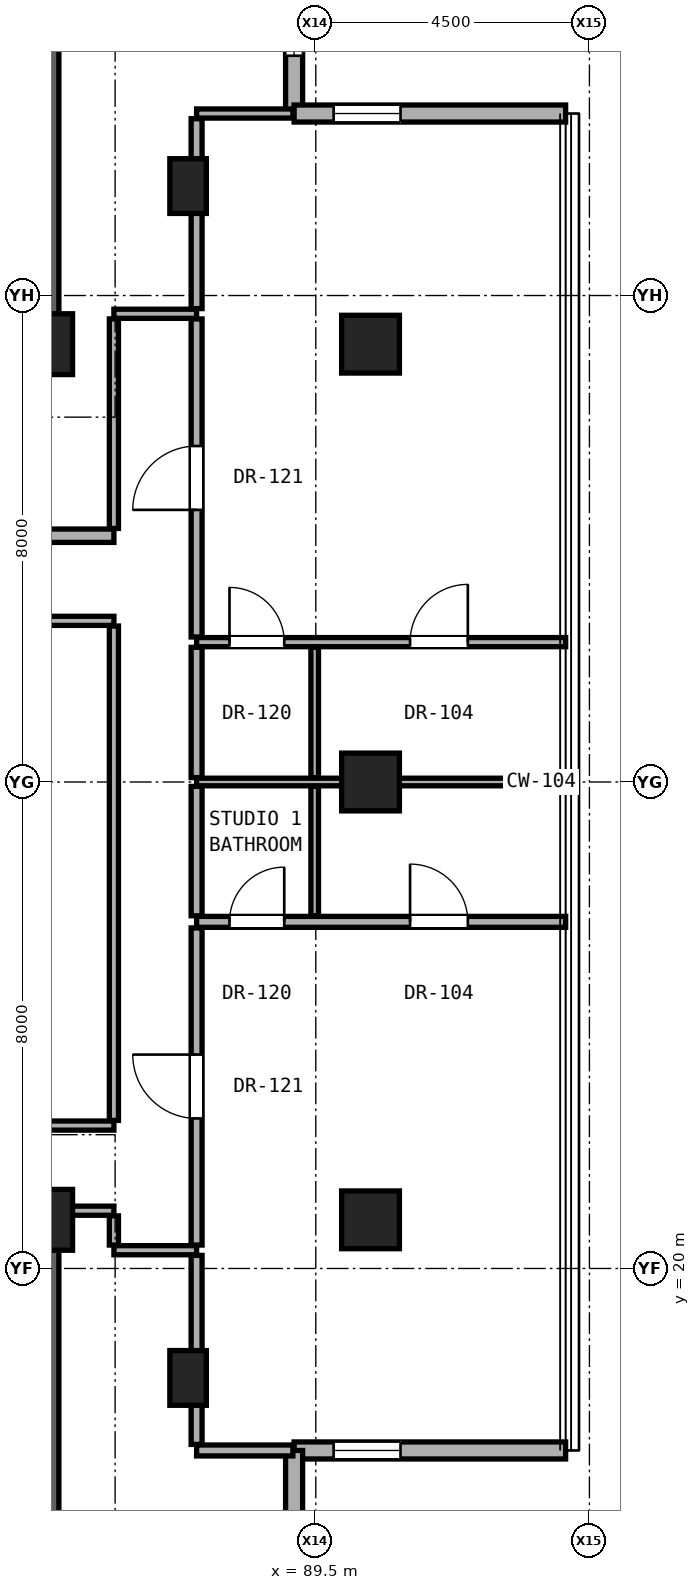
"""IFC4 building model, lengths in metres.
Left out: names, types, materials, properties, quantities, classifications, styles, units other than length and angle.
Written with IfcOpenShell. Run it as: python <this file> out.ifc"""

import sys

from ifc_helpers import new_model, si_unit, direction, frame, frame_2d, origin, origin_2d, place, context, subcontext, project, spatial, rectangle, hollow_rectangle, extrude, element, fill, save


model = new_model("IFC4")
c1 = context("Model", 3, precision=1e-05, world=origin(), true_north=direction((0.0, 1.0)))
c2 = subcontext(c1, "Body", "Model", "MODEL_VIEW")
j1 = project(units=[si_unit("LENGTHUNIT", "METRE"), si_unit("PLANEANGLEUNIT", "RADIAN")], contexts=[c1])
p1 = place(None, origin())
s1 = spatial("IfcSite", under=j1, at=p1, CompositionType="ELEMENT")
p2 = place(p1, origin())
s2 = spatial("IfcBuilding", under=s1, at=p2, CompositionType="ELEMENT")
p3 = place(p2, frame((0.0, 0.0, 160.9)))
s3 = spatial("IfcBuildingStorey", under=s2, at=p3, CompositionType="ELEMENT", Elevation=160.9)
for number, where, z_axis, x_axis in (
    (1, (85.0, 20.8, 0.0), (0.0, 0.0, 1.0), (1.0, 0.0, 0.0)),
    (2, (85.0, 35.2, 0.0), (0.0, 0.0, 1.0), (1.0, 0.0, 0.0)),
):
    element("IfcColumn", number, at=place(p3, frame(where, z_axis=z_axis, x_axis=x_axis)), inside=s3, PredefinedType="COLUMN", context=c2, shape_type="SweptSolid", body=[
        extrude(rectangle(XDim=1.0, YDim=1.0, at=origin_2d()), origin(), (0.0, 0.0, 1.0), 3.25),
    ])
for number, where, z_axis, x_axis in (
    (3, (90.4, 20.8, 0.0), (0.0, 0.0, 1.0), (1.0, 0.0, 0.0)),
    (4, (90.4, 28.0, 0.0), (0.0, 0.0, 1.0), (1.0, 0.0, 0.0)),
    (5, (90.4, 35.2, 0.0), (0.0, 0.0, 1.0), (1.0, 0.0, 0.0)),
):
    element("IfcColumn", number, at=place(p3, frame(where, z_axis=z_axis, x_axis=x_axis)), inside=s3, PredefinedType="COLUMN", context=c2, shape_type="SweptSolid", body=[
        extrude(hollow_rectangle(XDim=0.95, YDim=0.95, WallThickness=0.05, at=origin_2d()), origin(), (0.0, 0.0, 1.0), 3.25),
    ])
for number, where, z_axis, x_axis in (
    (6, (87.4, 18.2, 0.0), (0.0, 0.0, 1.0), (1.0, 0.0, 0.0)),
    (7, (87.4, 37.8, 0.0), (0.0, 0.0, 1.0), (1.0, 0.0, 0.0)),
):
    element("IfcColumn", number, at=place(p3, frame(where, z_axis=z_axis, x_axis=x_axis)), inside=s3, PredefinedType="PILASTER", context=c2, shape_type="SweptSolid", body=[
        extrude(rectangle(XDim=0.6, YDim=0.9, at=origin_2d()), origin(), (0.0, 0.0, 1.0), 3.25),
    ])
for number, where, z_axis, x_axis in (
    (8, (85.0, 35.2, 0.0), (0.0, 0.0, 1.0), (0.0, 1.0, 0.0)),
    (9, (85.0, 15.2, 0.0), (0.0, 0.0, 1.0), (0.0, 1.0, 0.0)),
):
    element("IfcWall", number, at=place(p3, frame(where, z_axis=z_axis, x_axis=x_axis)), inside=s3, PredefinedType="SHEAR", context=c2, shape_type="SweptSolid", body=[
        extrude(rectangle(XDim=5.6, YDim=0.55, at=frame_2d((2.8, 0.0))), origin(), (0.0, 0.0, 1.0), 3.05),
    ])
p4 = place(p3, frame((89.143, 38.993, 0.0), z_axis=(0.0, 0.0, 1.0), x_axis=(0.0, 1.0, 0.0)))
e10 = element("IfcWall", 10, at=p4, inside=s3, PredefinedType="SOLIDWALL", context=c2, shape_type="SweptSolid", body=[
    extrude(rectangle(XDim=4.465, YDim=0.28, at=frame_2d((2.232, 0.0))), origin(), (0.0, 0.0, 1.0), 3.03),
])
p5 = place(p4, frame((0.95, 0.0, 0.85)))
e11 = element("IfcOpeningElement", 11, at=p5, cuts=e10, PredefinedType="OPENING", context=c2, shape_type="SweptSolid", body=[
    extrude(rectangle(XDim=1.1, YDim=2.0, at=frame_2d((0.55, 1.0))), frame((0.0, 0.15, 0.0), z_axis=(0.0, -1.0, 0.0), x_axis=(1.0, 0.0, 0.0)), (0.0, 0.0, 1.0), 0.3),
])
p6 = place(p3, frame((89.143, 17.007, 0.0), z_axis=(0.0, 0.0, 1.0), x_axis=(1.0, 0.0, 0.0)))
e12 = element("IfcWall", 12, at=p6, inside=s3, PredefinedType="SOLIDWALL", context=c2, shape_type="SweptSolid", body=[
    extrude(rectangle(XDim=4.465, YDim=0.28, at=frame_2d((2.232, 0.0))), origin(), (0.0, 0.0, 1.0), 3.03),
])
p7 = place(p6, frame((0.65, 0.0, 0.85)))
e13 = element("IfcOpeningElement", 13, at=p7, cuts=e12, PredefinedType="OPENING", context=c2, shape_type="SweptSolid", body=[
    extrude(rectangle(XDim=1.1, YDim=2.0, at=frame_2d((0.55, 1.0))), frame((0.0, 0.15, 0.0), z_axis=(0.0, -1.0, 0.0), x_axis=(1.0, 0.0, 0.0)), (0.0, 0.0, 1.0), 0.3),
])
p8 = place(p3, frame((89.143, 12.542, 0.0), z_axis=(0.0, 0.0, 1.0), x_axis=(0.0, 1.0, 0.0)))
e14 = element("IfcWall", 14, at=p8, inside=s3, PredefinedType="SOLIDWALL", context=c2, shape_type="SweptSolid", body=[
    extrude(rectangle(XDim=4.465, YDim=0.28, at=frame_2d((2.232, 0.0))), origin(), (0.0, 0.0, 1.0), 3.03),
])
p9 = place(p3, frame((93.608, 38.993, 0.0), z_axis=(0.0, 0.0, 1.0), x_axis=(-1.0, 0.0, 0.0)))
e15 = element("IfcWall", 15, at=p9, inside=s3, PredefinedType="SOLIDWALL", context=c2, shape_type="SweptSolid", body=[
    extrude(rectangle(XDim=4.465, YDim=0.28, at=frame_2d((2.232, 0.0))), origin(), (0.0, 0.0, 1.0), 3.03),
])
p10 = place(p9, frame((2.715, 0.0, 0.85)))
e16 = element("IfcOpeningElement", 16, at=p10, cuts=e15, PredefinedType="OPENING", context=c2, shape_type="SweptSolid", body=[
    extrude(rectangle(XDim=1.1, YDim=2.0, at=frame_2d((0.55, 1.0))), frame((0.0, 0.15, 0.0), z_axis=(0.0, -1.0, 0.0), x_axis=(1.0, 0.0, 0.0)), (0.0, 0.0, 1.0), 0.3),
])
p11 = place(p3, frame((87.54, 17.007, 0.0), z_axis=(0.0, 0.0, 1.0), x_axis=(1.0, 0.0, 0.0)))
e17 = element("IfcWall", 17, at=p11, inside=s3, PredefinedType="PARTITIONING", context=c2, shape_type="SweptSolid", body=[
    extrude(rectangle(XDim=1.583, YDim=0.18, at=frame_2d((0.792, 0.0))), origin(), (0.0, 0.0, 1.0), 3.05),
])
p12 = place(p3, frame((86.18, 20.3, 0.0), z_axis=(0.0, 0.0, 1.0), x_axis=(1.0, 0.0, 0.0)))
e18 = element("IfcWall", 18, at=p12, inside=s3, PredefinedType="PARTITIONING", context=c2, shape_type="SweptSolid", body=[
    extrude(rectangle(XDim=1.36, YDim=0.15, at=frame_2d((0.68, 0.0))), origin(), (0.0, 0.0, 1.0), 3.05),
])
p13 = place(p3, frame((85.27, 20.95, 0.0), z_axis=(0.0, 0.0, 1.0), x_axis=(1.0, 0.0, 0.0)))
e19 = element("IfcWall", 19, at=p13, inside=s3, PredefinedType="PARTITIONING", context=c2, shape_type="SweptSolid", body=[
    extrude(rectangle(XDim=0.91, YDim=0.15, at=frame_2d((0.455, 0.0))), origin(), (0.0, 0.0, 1.0), 2.442),
])
p14 = place(p3, frame((66.68, 22.35, 0.0), z_axis=(0.0, 0.0, 1.0), x_axis=(1.0, 0.0, 0.0)))
e20 = element("IfcWall", 20, at=p14, inside=s3, PredefinedType="PARTITIONING", context=c2, shape_type="SweptSolid", body=[
    extrude(rectangle(XDim=19.5, YDim=0.15, at=frame_2d((9.75, 0.0))), origin(), (0.0, 0.0, 1.0), 2.186),
])
p15 = place(p14, frame((8.053, 0.0, 0.0)))
e21 = element("IfcOpeningElement", 21, at=p15, cuts=e20, PredefinedType="OPENING", context=c2, shape_type="SweptSolid", body=[
    extrude(rectangle(XDim=0.85, YDim=2.01, at=frame_2d((0.425, 1.005))), frame((0.0, 0.085, 0.0), z_axis=(0.0, -1.0, 0.0), x_axis=(1.0, 0.0, 0.0)), (0.0, 0.0, 1.0), 0.17),
])
p16 = place(p3, frame((87.54, 25.7, 0.0), z_axis=(0.0, 0.0, 1.0), x_axis=(1.0, 0.0, 0.0)))
e22 = element("IfcWall", 22, at=p16, inside=s3, PredefinedType="PARTITIONING", context=c2, shape_type="SweptSolid", body=[
    extrude(rectangle(XDim=6.069, YDim=0.18, at=frame_2d((3.034, 0.0))), origin(), (0.0, 0.0, 1.0), 2.269),
])
p17 = place(p16, frame((3.51, 0.0, 0.0)))
e23 = element("IfcOpeningElement", 23, at=p17, cuts=e22, PredefinedType="OPENING", context=c2, shape_type="SweptSolid", body=[
    extrude(rectangle(XDim=0.95, YDim=2.15, at=frame_2d((0.475, 1.075))), frame((0.0, 0.1, 0.0), z_axis=(0.0, -1.0, 0.0), x_axis=(1.0, 0.0, 0.0)), (0.0, 0.0, 1.0), 0.2),
])
p18 = place(p16, frame((0.541, 0.0, 0.0)))
e24 = element("IfcOpeningElement", 24, at=p18, cuts=e22, PredefinedType="OPENING", context=c2, shape_type="SweptSolid", body=[
    extrude(rectangle(XDim=0.9, YDim=2.1, at=frame_2d((0.45, 1.05))), frame((0.0, 0.1, 0.0), z_axis=(0.0, -1.0, 0.0), x_axis=(1.0, 0.0, 0.0)), (0.0, 0.0, 1.0), 0.2),
])
p19 = place(p3, frame((87.54, 28.0, 0.0), z_axis=(0.0, 0.0, 1.0), x_axis=(1.0, 0.0, 0.0)))
e25 = element("IfcWall", 25, at=p19, inside=s3, PredefinedType="PARTITIONING", context=c2, shape_type="SweptSolid", body=[
    extrude(rectangle(XDim=6.069, YDim=0.125, at=frame_2d((3.034, 0.0))), origin(), (0.0, 0.0, 1.0), 2.269),
])
p20 = place(p3, frame((87.54, 30.3, 0.0), z_axis=(0.0, 0.0, 1.0), x_axis=(1.0, 0.0, 0.0)))
e26 = element("IfcWall", 26, at=p20, inside=s3, PredefinedType="PARTITIONING", context=c2, shape_type="SweptSolid", body=[
    extrude(rectangle(XDim=6.069, YDim=0.15, at=frame_2d((3.034, 0.0))), origin(), (0.0, 0.0, 1.0), 2.269),
])
p21 = place(p20, frame((3.51, 0.0, 0.0)))
e27 = element("IfcOpeningElement", 27, at=p21, cuts=e26, PredefinedType="OPENING", context=c2, shape_type="SweptSolid", body=[
    extrude(rectangle(XDim=0.95, YDim=2.15, at=frame_2d((0.475, 1.075))), frame((0.0, 0.085, 0.0), z_axis=(0.0, -1.0, 0.0), x_axis=(1.0, 0.0, 0.0)), (0.0, 0.0, 1.0), 0.17),
])
p22 = place(p20, frame((0.541, 0.0, 0.0)))
e28 = element("IfcOpeningElement", 28, at=p22, cuts=e26, PredefinedType="OPENING", context=c2, shape_type="SweptSolid", body=[
    extrude(rectangle(XDim=0.9, YDim=2.1, at=frame_2d((0.45, 1.05))), frame((0.0, 0.085, 0.0), z_axis=(0.0, -1.0, 0.0), x_axis=(1.0, 0.0, 0.0)), (0.0, 0.0, 1.0), 0.17),
])
p23 = place(p3, frame((66.68, 30.65, 0.0), z_axis=(0.0, 0.0, 1.0), x_axis=(1.0, 0.0, 0.0)))
e29 = element("IfcWall", 29, at=p23, inside=s3, PredefinedType="PARTITIONING", context=c2, shape_type="SweptSolid", body=[
    extrude(rectangle(XDim=19.5, YDim=0.15, at=frame_2d((9.75, 0.0))), origin(), (0.0, 0.0, 1.0), 2.186),
])
p24 = place(p23, frame((3.745, 0.0, 0.0)))
e30 = element("IfcOpeningElement", 30, at=p24, cuts=e29, PredefinedType="OPENING", context=c2, shape_type="SweptSolid", body=[
    extrude(rectangle(XDim=0.95, YDim=2.15, at=frame_2d((0.475, 1.075))), frame((0.0, 0.085, 0.0), z_axis=(0.0, -1.0, 0.0), x_axis=(1.0, 0.0, 0.0)), (0.0, 0.0, 1.0), 0.17),
])
p25 = place(p23, frame((15.098, 0.0, 0.0)))
e31 = element("IfcOpeningElement", 31, at=p25, cuts=e29, PredefinedType="OPENING", context=c2, shape_type="SweptSolid", body=[
    extrude(rectangle(XDim=0.85, YDim=2.01, at=frame_2d((0.425, 1.005))), frame((0.0, 0.085, 0.0), z_axis=(0.0, -1.0, 0.0), x_axis=(1.0, 0.0, 0.0)), (0.0, 0.0, 1.0), 0.17),
])
p26 = place(p3, frame((71.55, 32.05, 0.0), z_axis=(0.0, 0.0, 1.0), x_axis=(1.0, 0.0, 0.0)))
e32 = element("IfcWall", 32, at=p26, inside=s3, PredefinedType="SOLIDWALL", context=c2, shape_type="SweptSolid", body=[
    extrude(rectangle(XDim=14.63, YDim=0.22, at=frame_2d((7.315, 0.0))), origin(), (0.0, 0.0, 1.0), 2.186),
])
p27 = place(p26, frame((6.065, 0.0, 0.0)))
e33 = element("IfcOpeningElement", 33, at=p27, cuts=e32, PredefinedType="OPENING", context=c2, shape_type="SweptSolid", body=[
    extrude(rectangle(XDim=0.85, YDim=2.01, at=frame_2d((0.425, 1.005))), frame((0.0, 0.12, 0.0), z_axis=(0.0, -1.0, 0.0), x_axis=(1.0, 0.0, 0.0)), (0.0, 0.0, 1.0), 0.24),
])
p28 = place(p26, frame((10.535, 0.0, 0.0)))
e34 = element("IfcOpeningElement", 34, at=p28, cuts=e32, PredefinedType="OPENING", context=c2, shape_type="SweptSolid", body=[
    extrude(rectangle(XDim=0.95, YDim=2.15, at=frame_2d((0.475, 1.075))), frame((0.0, 0.12, 0.0), z_axis=(0.0, -1.0, 0.0), x_axis=(1.0, 0.0, 0.0)), (0.0, 0.0, 1.0), 0.24),
])
p29 = place(p26, frame((1.65, 0.0, 0.0)))
e35 = element("IfcOpeningElement", 35, at=p29, cuts=e32, PredefinedType="OPENING", context=c2, shape_type="SweptSolid", body=[
    extrude(rectangle(XDim=0.85, YDim=2.01, at=frame_2d((0.425, 1.005))), frame((0.0, 0.12, 0.0), z_axis=(0.0, -1.0, 0.0), x_axis=(1.0, 0.0, 0.0)), (0.0, 0.0, 1.0), 0.24),
])
p30 = place(p3, frame((86.18, 35.7, 0.0), z_axis=(0.0, 0.0, 1.0), x_axis=(1.0, 0.0, 0.0)))
e36 = element("IfcWall", 36, at=p30, inside=s3, PredefinedType="PARTITIONING", context=c2, shape_type="SweptSolid", body=[
    extrude(rectangle(XDim=1.36, YDim=0.15, at=frame_2d((0.68, 0.0))), origin(), (0.0, 0.0, 1.0), 3.05),
])
p31 = place(p3, frame((87.54, 38.993, 0.0), z_axis=(0.0, 0.0, 1.0), x_axis=(1.0, 0.0, 0.0)))
e37 = element("IfcWall", 37, at=p31, inside=s3, PredefinedType="PARTITIONING", context=c2, shape_type="SweptSolid", body=[
    extrude(rectangle(XDim=1.583, YDim=0.15, at=frame_2d((0.792, 0.0))), origin(), (0.0, 0.0, 1.0), 3.05),
])
p32 = place(p3, frame((86.18, 20.385, 0.0), z_axis=(0.0, 0.0, 1.0), x_axis=(0.0, 1.0, 0.0)))
e38 = element("IfcWall", 38, at=p32, inside=s3, PredefinedType="PARTITIONING", context=c2, shape_type="SweptSolid", body=[
    extrude(rectangle(XDim=0.48, YDim=0.15, at=frame_2d((0.24, 0.0))), origin(), (0.0, 0.0, 1.0), 2.442),
])
p33 = place(p3, frame((86.18, 22.435, 0.0), z_axis=(0.0, 0.0, 1.0), x_axis=(0.0, 1.0, 0.0)))
e39 = element("IfcWall", 39, at=p33, inside=s3, PredefinedType="PARTITIONING", context=c2, shape_type="SweptSolid", body=[
    extrude(rectangle(XDim=8.13, YDim=0.15, at=frame_2d((4.065, 0.0))), origin(), (0.0, 0.0, 1.0), 2.346),
])
p34 = place(p3, frame((86.18, 32.17, 0.0), z_axis=(0.0, 0.0, 1.0), x_axis=(0.0, 1.0, 0.0)))
e40 = element("IfcWall", 40, at=p34, inside=s3, PredefinedType="PARTITIONING", context=c2, shape_type="SweptSolid", body=[
    extrude(rectangle(XDim=3.445, YDim=0.15, at=frame_2d((1.723, 0.0))), origin(), (0.0, 0.0, 1.0), 2.442),
])
p35 = place(p3, frame((87.54, 17.107, 0.0), z_axis=(0.0, 0.0, 1.0), x_axis=(0.0, 1.0, 0.0)))
e41 = element("IfcWall", 41, at=p35, inside=s3, PredefinedType="PARTITIONING", context=c2, shape_type="SweptSolid", body=[
    extrude(rectangle(XDim=3.108, YDim=0.18, at=frame_2d((1.554, 0.0))), origin(), (0.0, 0.0, 1.0), 2.493),
])
p36 = place(p3, frame((87.54, 20.385, 0.0), z_axis=(0.0, 0.0, 1.0), x_axis=(0.0, 1.0, 0.0)))
e42 = element("IfcWall", 42, at=p36, inside=s3, PredefinedType="PARTITIONING", context=c2, shape_type="SweptSolid", body=[
    extrude(rectangle(XDim=5.215, YDim=0.18, at=frame_2d((2.607, 0.0))), origin(), (0.0, 0.0, 1.0), 2.442),
])
p37 = place(p36, frame((2.083, 0.0, 0.0)))
e43 = element("IfcOpeningElement", 43, at=p37, cuts=e42, PredefinedType="OPENING", context=c2, shape_type="SweptSolid", body=[
    extrude(rectangle(XDim=1.05, YDim=2.2, at=frame_2d((0.525, 1.1))), frame((0.0, 0.1, 0.0), z_axis=(0.0, -1.0, 0.0), x_axis=(1.0, 0.0, 0.0)), (0.0, 0.0, 1.0), 0.2),
])
p38 = place(p3, frame((87.54, 25.8, 0.0), z_axis=(0.0, 0.0, 1.0), x_axis=(0.0, 1.0, 0.0)))
e44 = element("IfcWall", 44, at=p38, inside=s3, PredefinedType="PARTITIONING", context=c2, shape_type="SweptSolid", body=[
    extrude(rectangle(XDim=2.127, YDim=0.18, at=frame_2d((1.064, 0.0))), origin(), (0.0, 0.0, 1.0), 2.346),
])
p39 = place(p3, frame((87.54, 28.073, 0.0), z_axis=(0.0, 0.0, 1.0), x_axis=(0.0, 1.0, 0.0)))
e45 = element("IfcWall", 45, at=p39, inside=s3, PredefinedType="PARTITIONING", context=c2, shape_type="SweptSolid", body=[
    extrude(rectangle(XDim=2.143, YDim=0.18, at=frame_2d((1.071, 0.0))), origin(), (0.0, 0.0, 1.0), 2.346),
])
p40 = place(p3, frame((87.54, 30.385, 0.0), z_axis=(0.0, 0.0, 1.0), x_axis=(0.0, 1.0, 0.0)))
e46 = element("IfcWall", 46, at=p40, inside=s3, PredefinedType="PARTITIONING", context=c2, shape_type="SweptSolid", body=[
    extrude(rectangle(XDim=5.23, YDim=0.18, at=frame_2d((2.615, 0.0))), origin(), (0.0, 0.0, 1.0), 2.442),
])
p41 = place(p40, frame((2.09, 0.0, 0.0)))
e47 = element("IfcOpeningElement", 47, at=p41, cuts=e46, PredefinedType="OPENING", context=c2, shape_type="SweptSolid", body=[
    extrude(rectangle(XDim=1.05, YDim=2.2, at=frame_2d((0.525, 1.1))), frame((0.0, 0.1, 0.0), z_axis=(0.0, -1.0, 0.0), x_axis=(1.0, 0.0, 0.0)), (0.0, 0.0, 1.0), 0.2),
])
p42 = place(p3, frame((87.54, 35.785, 0.0), z_axis=(0.0, 0.0, 1.0), x_axis=(0.0, 1.0, 0.0)))
e48 = element("IfcWall", 48, at=p42, inside=s3, PredefinedType="PARTITIONING", context=c2, shape_type="SweptSolid", body=[
    extrude(rectangle(XDim=3.123, YDim=0.18, at=frame_2d((1.562, 0.0))), origin(), (0.0, 0.0, 1.0), 2.493),
])
p43 = place(p3, frame((89.482, 25.8, 0.0), z_axis=(0.0, 0.0, 1.0), x_axis=(0.0, 1.0, 0.0)))
e49 = element("IfcWall", 49, at=p43, inside=s3, PredefinedType="PARTITIONING", context=c2, shape_type="SweptSolid", body=[
    extrude(rectangle(XDim=2.127, YDim=0.125, at=frame_2d((1.064, 0.0))), origin(), (0.0, 0.0, 1.0), 2.346),
])
p44 = place(p3, frame((89.482, 28.073, 0.0), z_axis=(0.0, 0.0, 1.0), x_axis=(0.0, 1.0, 0.0)))
e50 = element("IfcWall", 50, at=p44, inside=s3, PredefinedType="PARTITIONING", context=c2, shape_type="SweptSolid", body=[
    extrude(rectangle(XDim=2.143, YDim=0.125, at=frame_2d((1.071, 0.0))), origin(), (0.0, 0.0, 1.0), 2.346),
])
p45 = place(p5, origin())
e51 = element("IfcWindow", 51, at=p45, inside=s3, PartitioningType="SINGLE_PANEL", PredefinedType="WINDOW", context=c2, shape_type="SweptSolid", body=[
    extrude(rectangle(XDim=1.1, YDim=2.0, at=frame_2d((0.55, 1.0))), frame((0.0, 0.03, 0.0), z_axis=(0.0, -1.0, 0.0), x_axis=(1.0, 0.0, 0.0)), (0.0, 0.0, 1.0), 0.06),
])
fill(e11, e51)
p46 = place(p7, origin())
e52 = element("IfcWindow", 52, at=p46, inside=s3, PartitioningType="SINGLE_PANEL", PredefinedType="WINDOW", context=c2, shape_type="SweptSolid", body=[
    extrude(rectangle(XDim=1.1, YDim=2.0, at=frame_2d((0.55, 1.0))), frame((0.0, 0.03, 0.0), z_axis=(0.0, -1.0, 0.0), x_axis=(1.0, 0.0, 0.0)), (0.0, 0.0, 1.0), 0.06),
])
fill(e13, e52)
p47 = place(p10, origin())
e53 = element("IfcWindow", 53, at=p47, inside=s3, PartitioningType="SINGLE_PANEL", PredefinedType="WINDOW", context=c2, shape_type="SweptSolid", body=[
    extrude(rectangle(XDim=1.1, YDim=2.0, at=frame_2d((0.55, 1.0))), frame((0.0, 0.03, 0.0), z_axis=(0.0, -1.0, 0.0), x_axis=(1.0, 0.0, 0.0)), (0.0, 0.0, 1.0), 0.06),
])
fill(e16, e53)
p48 = place(p37, origin())
e54 = element("IfcDoor", 54, at=p48, inside=s3, OperationType="SINGLE_SWING_RIGHT", PredefinedType="DOOR", context=c2, shape_type="SweptSolid", body=[
    extrude(rectangle(XDim=1.05, YDim=2.2, at=frame_2d((0.525, 1.1))), frame((0.0, 0.025, 0.0), z_axis=(0.0, -1.0, 0.0), x_axis=(1.0, 0.0, 0.0)), (0.0, 0.0, 1.0), 0.05),
])
fill(e43, e54)
p49 = place(p17, origin())
e55 = element("IfcDoor", 55, at=p49, inside=s3, OperationType="SINGLE_SWING_LEFT", PredefinedType="DOOR", context=c2, shape_type="SweptSolid", body=[
    extrude(rectangle(XDim=0.95, YDim=2.15, at=frame_2d((0.475, 1.075))), frame((0.0, 0.025, 0.0), z_axis=(0.0, -1.0, 0.0), x_axis=(1.0, 0.0, 0.0)), (0.0, 0.0, 1.0), 0.05),
])
fill(e23, e55)
p50 = place(p18, origin())
e56 = element("IfcDoor", 56, at=p50, inside=s3, OperationType="SINGLE_SWING_RIGHT", PredefinedType="DOOR", context=c2, shape_type="SweptSolid", body=[
    extrude(rectangle(XDim=0.9, YDim=2.1, at=frame_2d((0.45, 1.05))), frame((0.0, 0.025, 0.0), z_axis=(0.0, -1.0, 0.0), x_axis=(1.0, 0.0, 0.0)), (0.0, 0.0, 1.0), 0.05),
])
fill(e24, e56)
p51 = place(p41, origin())
e57 = element("IfcDoor", 57, at=p51, inside=s3, OperationType="SINGLE_SWING_LEFT", PredefinedType="DOOR", context=c2, shape_type="SweptSolid", body=[
    extrude(rectangle(XDim=1.05, YDim=2.2, at=frame_2d((0.525, 1.1))), frame((0.0, 0.025, 0.0), z_axis=(0.0, -1.0, 0.0), x_axis=(1.0, 0.0, 0.0)), (0.0, 0.0, 1.0), 0.05),
])
fill(e47, e57)
p52 = place(p21, origin())
e58 = element("IfcDoor", 58, at=p52, inside=s3, OperationType="SINGLE_SWING_RIGHT", PredefinedType="DOOR", context=c2, shape_type="SweptSolid", body=[
    extrude(rectangle(XDim=0.95, YDim=2.15, at=frame_2d((0.475, 1.075))), frame((0.0, 0.025, 0.0), z_axis=(0.0, -1.0, 0.0), x_axis=(1.0, 0.0, 0.0)), (0.0, 0.0, 1.0), 0.05),
])
fill(e27, e58)
p53 = place(p22, origin())
e59 = element("IfcDoor", 59, at=p53, inside=s3, OperationType="SINGLE_SWING_LEFT", PredefinedType="DOOR", context=c2, shape_type="SweptSolid", body=[
    extrude(rectangle(XDim=0.9, YDim=2.1, at=frame_2d((0.45, 1.05))), frame((0.0, 0.025, 0.0), z_axis=(0.0, -1.0, 0.0), x_axis=(1.0, 0.0, 0.0)), (0.0, 0.0, 1.0), 0.05),
])
fill(e28, e59)
save(model, sys.argv[1])
